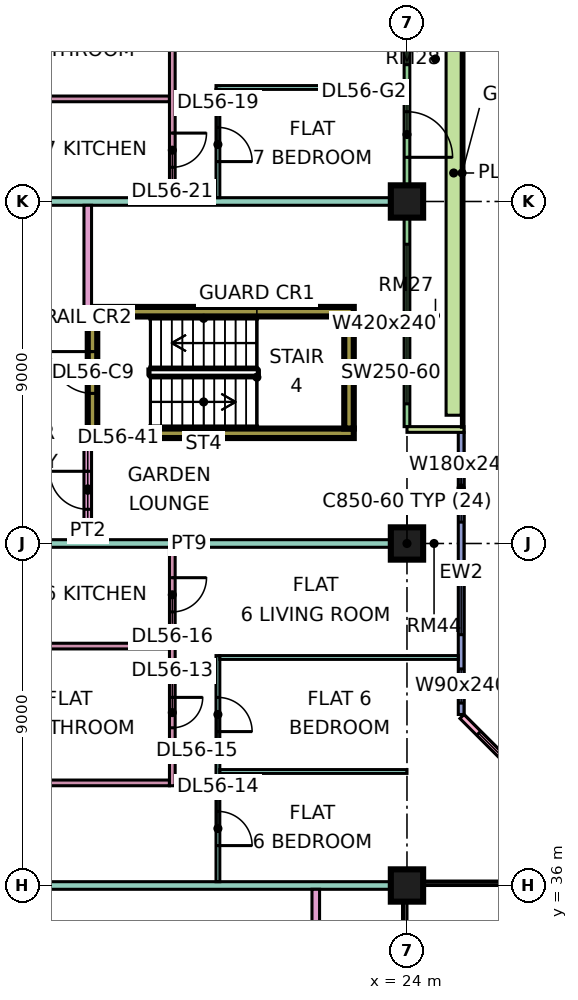
"""IFC4 building model, lengths in metres.
Left out: names, types, materials, properties, quantities, classifications, styles, units other than length and angle.
Written with IfcOpenShell. Run it as: python <this file> out.ifc"""

import sys

from ifc_helpers import new_model, si_unit, direction, frame, frame_2d, origin, origin_2d, place, context, subcontext, project, spatial, rectangle, extrude, element, fill, save


model = new_model("IFC4")
c1 = context("Model", 3, precision=1e-05, world=origin(), true_north=direction((0.0, 1.0)))
c2 = subcontext(c1, "Body", "Model", "MODEL_VIEW")
j1 = project(units=[si_unit("LENGTHUNIT", "METRE"), si_unit("PLANEANGLEUNIT", "RADIAN")], contexts=[c1])
p1 = place(None, origin())
s1 = spatial("IfcSite", under=j1, at=p1, CompositionType="ELEMENT")
p2 = place(p1, origin())
s2 = spatial("IfcBuilding", under=s1, at=p2, CompositionType="ELEMENT")
p3 = place(p2, frame((0.0, 0.0, 237.9)))
s3 = spatial("IfcBuildingStorey", under=s2, at=p3, CompositionType="ELEMENT", Elevation=237.9)
for number, where, z_axis, x_axis in (
    (1, (24.0, 36.0, 0.0), (0.0, 0.0, 1.0), (1.0, 0.0, 0.0)),
    (2, (24.0, 45.0, 0.0), (0.0, 0.0, 1.0), (1.0, 0.0, 0.0)),
    (3, (24.0, 54.0, 0.0), (0.0, 0.0, 1.0), (1.0, 0.0, 0.0)),
):
    element("IfcColumn", number, at=place(p3, frame(where, z_axis=z_axis, x_axis=x_axis)), inside=s3, PredefinedType="COLUMN", context=c2, shape_type="SweptSolid", body=[
        extrude(rectangle(XDim=0.85, YDim=0.85, at=origin_2d()), origin(), (0.0, 0.0, 1.0), 3.75),
    ])
for number, where, z_axis, x_axis in (
    (4, (15.6, 47.9, 0.0), (0.0, 0.0, 1.0), (1.0, 0.0, 0.0)),
    (5, (15.6, 51.1, 0.0), (0.0, 0.0, 1.0), (1.0, 0.0, 0.0)),
):
    element("IfcWall", number, at=place(p3, frame(where, z_axis=z_axis, x_axis=x_axis)), inside=s3, PredefinedType="SHEAR", context=c2, shape_type="SweptSolid", body=[
        extrude(rectangle(XDim=7.0, YDim=0.25, at=frame_2d((3.5, 0.0))), origin(), (0.0, 0.0, 1.0), 3.75),
    ])
p4 = place(p3, frame((15.725, 48.025, 0.0), z_axis=(0.0, 0.0, 1.0), x_axis=(0.0, 1.0, 0.0)))
e6 = element("IfcWall", 6, at=p4, inside=s3, PredefinedType="SHEAR", context=c2, shape_type="SweptSolid", body=[
    extrude(rectangle(XDim=2.95, YDim=0.25, at=frame_2d((1.475, 0.0))), origin(), (0.0, 0.0, 1.0), 3.75),
])
p5 = place(p4, frame((0.925, 0.0, 0.0)))
e7 = element("IfcOpeningElement", 7, at=p5, cuts=e6, PredefinedType="OPENING", context=c2, shape_type="SweptSolid", body=[
    extrude(rectangle(XDim=1.1, YDim=2.2, at=frame_2d((0.55, 1.1))), frame((0.0, 0.135, 0.0), z_axis=(0.0, -1.0, 0.0), x_axis=(1.0, 0.0, 0.0)), (0.0, 0.0, 1.0), 0.27),
])
p6 = place(p3, frame((22.475, 48.025, 0.0), z_axis=(0.0, 0.0, 1.0), x_axis=(0.0, 1.0, 0.0)))
e8 = element("IfcWall", 8, at=p6, inside=s3, PredefinedType="SHEAR", context=c2, shape_type="SweptSolid", body=[
    extrude(rectangle(XDim=2.95, YDim=0.25, at=frame_2d((1.475, 0.0))), origin(), (0.0, 0.0, 1.0), 3.75),
])
p7 = place(p3, frame((28.447, 37.447, 0.0), z_axis=(0.0, 0.0, 1.0), x_axis=(-0.707106781187, 0.707106781187, 0.0)))
e9 = element("IfcWall", 9, at=p7, inside=s3, PredefinedType="SOLIDWALL", context=c2, shape_type="SweptSolid", body=[
    extrude(rectangle(XDim=4.243, YDim=0.15, at=frame_2d((2.121, 0.0))), origin(), (0.0, 0.0, 1.0), 3.35),
])
p8 = place(p7, frame((0.621, 0.0, 0.45)))
e10 = element("IfcOpeningElement", 10, at=p8, cuts=e9, PredefinedType="OPENING", context=c2, shape_type="SweptSolid", body=[
    extrude(rectangle(XDim=3.0, YDim=2.4, at=frame_2d((1.5, 1.2))), frame((0.0, 0.085, 0.0), z_axis=(0.0, -1.0, 0.0), x_axis=(1.0, 0.0, 0.0)), (0.0, 0.0, 1.0), 0.17),
])
p9 = place(p3, frame((25.425, 40.5, 0.0), z_axis=(0.0, 0.0, 1.0), x_axis=(0.0, 1.0, 0.0)))
e11 = element("IfcWall", 11, at=p9, inside=s3, PredefinedType="SOLIDWALL", context=c2, shape_type="SweptSolid", body=[
    extrude(rectangle(XDim=7.425, YDim=0.15, at=frame_2d((3.712, 0.0))), origin(), (0.0, 0.0, 1.0), 3.35),
])
p10 = place(p9, frame((0.3, 0.0, 0.45)))
e12 = element("IfcOpeningElement", 12, at=p10, cuts=e11, PredefinedType="OPENING", context=c2, shape_type="SweptSolid", body=[
    extrude(rectangle(XDim=0.9, YDim=2.4, at=frame_2d((0.45, 1.2))), frame((0.0, 0.085, 0.0), z_axis=(0.0, -1.0, 0.0), x_axis=(1.0, 0.0, 0.0)), (0.0, 0.0, 1.0), 0.17),
])
p11 = place(p9, frame((2.1, 0.0, 0.45)))
e13 = element("IfcOpeningElement", 13, at=p11, cuts=e11, PredefinedType="OPENING", context=c2, shape_type="SweptSolid", body=[
    extrude(rectangle(XDim=1.8, YDim=2.4, at=frame_2d((0.9, 1.2))), frame((0.0, 0.085, 0.0), z_axis=(0.0, -1.0, 0.0), x_axis=(1.0, 0.0, 0.0)), (0.0, 0.0, 1.0), 0.17),
])
p12 = place(p9, frame((5.062, 0.0, 0.45)))
e14 = element("IfcOpeningElement", 14, at=p12, cuts=e11, PredefinedType="OPENING", context=c2, shape_type="SweptSolid", body=[
    extrude(rectangle(XDim=1.8, YDim=2.4, at=frame_2d((0.9, 1.2))), frame((0.0, 0.085, 0.0), z_axis=(0.0, -1.0, 0.0), x_axis=(1.0, 0.0, 0.0)), (0.0, 0.0, 1.0), 0.17),
])
p13 = place(p3, frame((24.0, 48.075, 0.0), z_axis=(0.0, 0.0, 1.0), x_axis=(0.0, 1.0, 0.0)))
e15 = element("IfcWall", 15, at=p13, inside=s3, PredefinedType="SOLIDWALL", context=c2, shape_type="SweptSolid", body=[
    extrude(rectangle(XDim=13.35, YDim=0.15, at=frame_2d((6.675, 0.0))), origin(), (0.0, 0.0, 1.0), 3.35),
])
p14 = place(p13, frame((0.6, 0.0, 0.45)))
e16 = element("IfcOpeningElement", 16, at=p14, cuts=e15, PredefinedType="OPENING", context=c2, shape_type="SweptSolid", body=[
    extrude(rectangle(XDim=4.2, YDim=2.4, at=frame_2d((2.1, 1.2))), frame((0.0, 0.085, 0.0), z_axis=(0.0, -1.0, 0.0), x_axis=(1.0, 0.0, 0.0)), (0.0, 0.0, 1.0), 0.17),
])
p15 = place(p13, frame((7.087, 0.0, 0.0)))
e17 = element("IfcOpeningElement", 17, at=p15, cuts=e15, PredefinedType="OPENING", context=c2, shape_type="SweptSolid", body=[
    extrude(rectangle(XDim=1.2, YDim=2.4, at=frame_2d((0.6, 1.2))), frame((0.0, 0.085, 0.0), z_axis=(0.0, -1.0, 0.0), x_axis=(1.0, 0.0, 0.0)), (0.0, 0.0, 1.0), 0.17),
])
p16 = place(p13, frame((9.525, 0.0, 0.45)))
e18 = element("IfcOpeningElement", 18, at=p16, cuts=e15, PredefinedType="OPENING", context=c2, shape_type="SweptSolid", body=[
    extrude(rectangle(XDim=1.8, YDim=2.4, at=frame_2d((0.9, 1.2))), frame((0.0, 0.085, 0.0), z_axis=(0.0, -1.0, 0.0), x_axis=(1.0, 0.0, 0.0)), (0.0, 0.0, 1.0), 0.17),
])
p17 = place(p13, frame((12.188, 0.0, 0.45)))
e19 = element("IfcOpeningElement", 19, at=p17, cuts=e15, PredefinedType="OPENING", context=c2, shape_type="SweptSolid", body=[
    extrude(rectangle(XDim=0.9, YDim=2.4, at=frame_2d((0.45, 1.2))), frame((0.0, 0.085, 0.0), z_axis=(0.0, -1.0, 0.0), x_axis=(1.0, 0.0, 0.0)), (0.0, 0.0, 1.0), 0.17),
])
p18 = place(p3, frame((25.5, 48.0, 0.0), z_axis=(0.0, 0.0, 1.0), x_axis=(-1.0, 0.0, 0.0)))
e20 = element("IfcWall", 20, at=p18, inside=s3, PredefinedType="SOLIDWALL", context=c2, shape_type="SweptSolid", body=[
    extrude(rectangle(XDim=1.5, YDim=0.15, at=frame_2d((0.75, 0.0))), origin(), (0.0, 0.0, 1.0), 3.35),
])
p19 = place(p3, frame((25.229, 48.375, 0.0), z_axis=(0.0, 0.0, 1.0), x_axis=(0.0, 1.0, 0.0)))
e21 = element("IfcWall", 21, at=p19, inside=s3, PredefinedType="SOLIDWALL", context=c2, shape_type="SweptSolid", body=[
    extrude(rectangle(XDim=12.75, YDim=0.4, at=frame_2d((6.375, 0.0))), origin(), (0.0, 0.0, 1.0), 0.7),
])
p20 = place(p3, frame((12.525, 36.0, 0.0), z_axis=(0.0, 0.0, 1.0), x_axis=(1.0, 0.0, 0.0)))
e22 = element("IfcWall", 22, at=p20, inside=s3, PredefinedType="PARTITIONING", context=c2, shape_type="SweptSolid", body=[
    extrude(rectangle(XDim=11.475, YDim=0.2, at=frame_2d((5.738, 0.0))), origin(), (0.0, 0.0, 1.0), 3.35),
])
for number, where, z_axis, x_axis in (
    (23, (12.525, 38.7, 0.0), (0.0, 0.0, 1.0), (1.0, 0.0, 0.0)),
    (24, (12.525, 42.3, 0.0), (0.0, 0.0, 1.0), (1.0, 0.0, 0.0)),
):
    element("IfcWall", number, at=place(p3, frame(where, z_axis=z_axis, x_axis=x_axis)), inside=s3, PredefinedType="PARTITIONING", context=c2, shape_type="SweptSolid", body=[
        extrude(rectangle(XDim=5.225, YDim=0.15, at=frame_2d((2.613, 0.0))), origin(), (0.0, 0.0, 1.0), 3.35),
    ])
p21 = place(p3, frame((12.525, 45.0, 0.0), z_axis=(0.0, 0.0, 1.0), x_axis=(1.0, 0.0, 0.0)))
e25 = element("IfcWall", 25, at=p21, inside=s3, PredefinedType="PARTITIONING", context=c2, shape_type="SweptSolid", body=[
    extrude(rectangle(XDim=11.475, YDim=0.2, at=frame_2d((5.738, 0.0))), origin(), (0.0, 0.0, 1.0), 3.35),
])
p22 = place(p3, frame((12.525, 54.0, 0.0), z_axis=(0.0, 0.0, 1.0), x_axis=(1.0, 0.0, 0.0)))
e26 = element("IfcWall", 26, at=p22, inside=s3, PredefinedType="PARTITIONING", context=c2, shape_type="SweptSolid", body=[
    extrude(rectangle(XDim=11.401, YDim=0.2, at=frame_2d((5.701, 0.0))), origin(), (0.0, 0.0, 1.0), 3.35),
])
p23 = place(p3, frame((12.525, 56.7, 0.0), z_axis=(0.0, 0.0, 1.0), x_axis=(1.0, 0.0, 0.0)))
e27 = element("IfcWall", 27, at=p23, inside=s3, PredefinedType="PARTITIONING", context=c2, shape_type="SweptSolid", body=[
    extrude(rectangle(XDim=5.225, YDim=0.15, at=frame_2d((2.613, 0.0))), origin(), (0.0, 0.0, 1.0), 3.35),
])
p24 = place(p3, frame((15.6, 45.1, 0.0), z_axis=(0.0, 0.0, 1.0), x_axis=(0.0, 1.0, 0.0)))
e28 = element("IfcWall", 28, at=p24, inside=s3, PredefinedType="PARTITIONING", context=c2, shape_type="SweptSolid", body=[
    extrude(rectangle(XDim=2.675, YDim=0.2, at=frame_2d((1.337, 0.0))), origin(), (0.0, 0.0, 1.0), 3.35),
])
p25 = place(p24, frame((0.8, 0.0, 0.0)))
e29 = element("IfcOpeningElement", 29, at=p25, cuts=e28, PredefinedType="OPENING", context=c2, shape_type="SweptSolid", body=[
    extrude(rectangle(XDim=1.0, YDim=2.1, at=frame_2d((0.5, 1.05))), frame((0.0, 0.11, 0.0), z_axis=(0.0, -1.0, 0.0), x_axis=(1.0, 0.0, 0.0)), (0.0, 0.0, 1.0), 0.22),
])
p26 = place(p3, frame((15.6, 51.225, 0.0), z_axis=(0.0, 0.0, 1.0), x_axis=(0.0, 1.0, 0.0)))
e30 = element("IfcWall", 30, at=p26, inside=s3, PredefinedType="PARTITIONING", context=c2, shape_type="SweptSolid", body=[
    extrude(rectangle(XDim=2.675, YDim=0.2, at=frame_2d((1.337, 0.0))), origin(), (0.0, 0.0, 1.0), 3.35),
])
p27 = place(p3, frame((17.825, 38.625, 0.0), z_axis=(0.0, 0.0, 1.0), x_axis=(0.0, 1.0, 0.0)))
e31 = element("IfcWall", 31, at=p27, inside=s3, PredefinedType="PARTITIONING", context=c2, shape_type="SweptSolid", body=[
    extrude(rectangle(XDim=6.275, YDim=0.15, at=frame_2d((3.137, 0.0))), origin(), (0.0, 0.0, 1.0), 3.35),
])
p28 = place(p27, frame((1.525, 0.0, 0.0)))
e32 = element("IfcOpeningElement", 32, at=p28, cuts=e31, PredefinedType="OPENING", context=c2, shape_type="SweptSolid", body=[
    extrude(rectangle(XDim=0.8, YDim=2.1, at=frame_2d((0.4, 1.05))), frame((0.0, 0.085, 0.0), z_axis=(0.0, -1.0, 0.0), x_axis=(1.0, 0.0, 0.0)), (0.0, 0.0, 1.0), 0.17),
])
p29 = place(p27, frame((4.575, 0.0, 0.0)))
e33 = element("IfcOpeningElement", 33, at=p29, cuts=e31, PredefinedType="OPENING", context=c2, shape_type="SweptSolid", body=[
    extrude(rectangle(XDim=0.9, YDim=2.1, at=frame_2d((0.45, 1.05))), frame((0.0, 0.085, 0.0), z_axis=(0.0, -1.0, 0.0), x_axis=(1.0, 0.0, 0.0)), (0.0, 0.0, 1.0), 0.17),
])
p30 = place(p3, frame((17.825, 54.1, 0.0), z_axis=(0.0, 0.0, 1.0), x_axis=(0.0, 1.0, 0.0)))
e34 = element("IfcWall", 34, at=p30, inside=s3, PredefinedType="PARTITIONING", context=c2, shape_type="SweptSolid", body=[
    extrude(rectangle(XDim=5.975, YDim=0.15, at=frame_2d((2.987, 0.0))), origin(), (0.0, 0.0, 1.0), 3.35),
])
p31 = place(p30, frame((3.9, 0.0, 0.0)))
e35 = element("IfcOpeningElement", 35, at=p31, cuts=e34, PredefinedType="OPENING", context=c2, shape_type="SweptSolid", body=[
    extrude(rectangle(XDim=0.8, YDim=2.1, at=frame_2d((0.4, 1.05))), frame((0.0, 0.085, 0.0), z_axis=(0.0, -1.0, 0.0), x_axis=(1.0, 0.0, 0.0)), (0.0, 0.0, 1.0), 0.17),
])
p32 = place(p30, frame((0.8, 0.0, 0.0)))
e36 = element("IfcOpeningElement", 36, at=p32, cuts=e34, PredefinedType="OPENING", context=c2, shape_type="SweptSolid", body=[
    extrude(rectangle(XDim=0.9, YDim=2.1, at=frame_2d((0.45, 1.05))), frame((0.0, 0.085, 0.0), z_axis=(0.0, -1.0, 0.0), x_axis=(1.0, 0.0, 0.0)), (0.0, 0.0, 1.0), 0.17),
])
p33 = place(p3, frame((18.975, 57.0, 0.0), z_axis=(0.0, 0.0, 1.0), x_axis=(1.0, 0.0, 0.0)))
e37 = element("IfcWall", 37, at=p33, inside=s3, PredefinedType="PARTITIONING", context=c2, shape_type="SweptSolid", body=[
    extrude(rectangle(XDim=4.951, YDim=0.1, at=frame_2d((2.476, 0.0))), origin(), (0.0, 0.0, 1.0), 3.35),
])
p34 = place(p3, frame((19.025, 36.1, 0.0), z_axis=(0.0, 0.0, 1.0), x_axis=(0.0, 1.0, 0.0)))
e38 = element("IfcWall", 38, at=p34, inside=s3, PredefinedType="PARTITIONING", context=c2, shape_type="SweptSolid", body=[
    extrude(rectangle(XDim=5.95, YDim=0.1, at=frame_2d((2.975, 0.0))), origin(), (0.0, 0.0, 1.0), 3.35),
])
p35 = place(p34, frame((0.95, 0.0, 0.0)))
e39 = element("IfcOpeningElement", 39, at=p35, cuts=e38, PredefinedType="OPENING", context=c2, shape_type="SweptSolid", body=[
    extrude(rectangle(XDim=0.9, YDim=2.1, at=frame_2d((0.45, 1.05))), frame((0.0, 0.06, 0.0), z_axis=(0.0, -1.0, 0.0), x_axis=(1.0, 0.0, 0.0)), (0.0, 0.0, 1.0), 0.12),
])
p36 = place(p34, frame((3.95, 0.0, 0.0)))
e40 = element("IfcOpeningElement", 40, at=p36, cuts=e38, PredefinedType="OPENING", context=c2, shape_type="SweptSolid", body=[
    extrude(rectangle(XDim=0.9, YDim=2.1, at=frame_2d((0.45, 1.05))), frame((0.0, 0.06, 0.0), z_axis=(0.0, -1.0, 0.0), x_axis=(1.0, 0.0, 0.0)), (0.0, 0.0, 1.0), 0.12),
])
p37 = place(p3, frame((19.025, 54.1, 0.0), z_axis=(0.0, 0.0, 1.0), x_axis=(0.0, 1.0, 0.0)))
e41 = element("IfcWall", 41, at=p37, inside=s3, PredefinedType="PARTITIONING", context=c2, shape_type="SweptSolid", body=[
    extrude(rectangle(XDim=2.85, YDim=0.1, at=frame_2d((1.425, 0.0))), origin(), (0.0, 0.0, 1.0), 3.35),
])
p38 = place(p37, frame((0.95, 0.0, 0.0)))
e42 = element("IfcOpeningElement", 42, at=p38, cuts=e41, PredefinedType="OPENING", context=c2, shape_type="SweptSolid", body=[
    extrude(rectangle(XDim=0.9, YDim=2.1, at=frame_2d((0.45, 1.05))), frame((0.0, 0.06, 0.0), z_axis=(0.0, -1.0, 0.0), x_axis=(1.0, 0.0, 0.0)), (0.0, 0.0, 1.0), 0.12),
])
p39 = place(p3, frame((19.075, 39.0, 0.0), z_axis=(0.0, 0.0, 1.0), x_axis=(1.0, 0.0, 0.0)))
e43 = element("IfcWall", 43, at=p39, inside=s3, PredefinedType="PARTITIONING", context=c2, shape_type="SweptSolid", body=[
    extrude(rectangle(XDim=4.925, YDim=0.1, at=frame_2d((2.462, 0.0))), origin(), (0.0, 0.0, 1.0), 3.35),
])
p40 = place(p3, frame((19.075, 42.0, 0.0), z_axis=(0.0, 0.0, 1.0), x_axis=(1.0, 0.0, 0.0)))
e44 = element("IfcWall", 44, at=p40, inside=s3, PredefinedType="PARTITIONING", context=c2, shape_type="SweptSolid", body=[
    extrude(rectangle(XDim=6.275, YDim=0.1, at=frame_2d((3.138, 0.0))), origin(), (0.0, 0.0, 1.0), 3.35),
])
p41 = place(p3, frame((21.6, 23.9, 0.0), z_axis=(0.0, 0.0, 1.0), x_axis=(0.0, 1.0, 0.0)))
e45 = element("IfcWall", 45, at=p41, inside=s3, PredefinedType="PARTITIONING", context=c2, shape_type="SweptSolid", body=[
    extrude(rectangle(XDim=12.0, YDim=0.2, at=frame_2d((6.0, 0.0))), origin(), (0.0, 0.0, 1.0), 3.35),
])
p42 = place(p8, origin())
e46 = element("IfcWindow", 46, at=p42, inside=s3, PartitioningType="SINGLE_PANEL", PredefinedType="WINDOW", context=c2, shape_type="SweptSolid", body=[
    extrude(rectangle(XDim=3.0, YDim=2.4, at=frame_2d((1.5, 1.2))), frame((0.0, 0.03, 0.0), z_axis=(0.0, -1.0, 0.0), x_axis=(1.0, 0.0, 0.0)), (0.0, 0.0, 1.0), 0.06),
])
fill(e10, e46)
p43 = place(p10, origin())
e47 = element("IfcWindow", 47, at=p43, inside=s3, PartitioningType="SINGLE_PANEL", PredefinedType="WINDOW", context=c2, shape_type="SweptSolid", body=[
    extrude(rectangle(XDim=0.9, YDim=2.4, at=frame_2d((0.45, 1.2))), frame((0.0, 0.03, 0.0), z_axis=(0.0, -1.0, 0.0), x_axis=(1.0, 0.0, 0.0)), (0.0, 0.0, 1.0), 0.06),
])
fill(e12, e47)
p44 = place(p11, origin())
e48 = element("IfcWindow", 48, at=p44, inside=s3, PartitioningType="SINGLE_PANEL", PredefinedType="WINDOW", context=c2, shape_type="SweptSolid", body=[
    extrude(rectangle(XDim=1.8, YDim=2.4, at=frame_2d((0.9, 1.2))), frame((0.0, 0.03, 0.0), z_axis=(0.0, -1.0, 0.0), x_axis=(1.0, 0.0, 0.0)), (0.0, 0.0, 1.0), 0.06),
])
fill(e13, e48)
p45 = place(p12, origin())
e49 = element("IfcWindow", 49, at=p45, inside=s3, PartitioningType="SINGLE_PANEL", PredefinedType="WINDOW", context=c2, shape_type="SweptSolid", body=[
    extrude(rectangle(XDim=1.8, YDim=2.4, at=frame_2d((0.9, 1.2))), frame((0.0, 0.03, 0.0), z_axis=(0.0, -1.0, 0.0), x_axis=(1.0, 0.0, 0.0)), (0.0, 0.0, 1.0), 0.06),
])
fill(e14, e49)
p46 = place(p14, origin())
e50 = element("IfcWindow", 50, at=p46, inside=s3, PartitioningType="SINGLE_PANEL", PredefinedType="WINDOW", context=c2, shape_type="SweptSolid", body=[
    extrude(rectangle(XDim=4.2, YDim=2.4, at=frame_2d((2.1, 1.2))), frame((0.0, 0.03, 0.0), z_axis=(0.0, -1.0, 0.0), x_axis=(1.0, 0.0, 0.0)), (0.0, 0.0, 1.0), 0.06),
])
fill(e16, e50)
p47 = place(p15, frame((1.2, 0.0, 0.0), z_axis=(0.0, 0.0, 1.0), x_axis=(-1.0, 0.0, 0.0)))
e51 = element("IfcDoor", 51, at=p47, inside=s3, OperationType="DOUBLE_DOOR_SINGLE_SWING", PredefinedType="DOOR", context=c2, shape_type="SweptSolid", body=[
    extrude(rectangle(XDim=1.2, YDim=2.4, at=frame_2d((0.6, 1.2))), frame((0.0, 0.025, 0.0), z_axis=(0.0, -1.0, 0.0), x_axis=(1.0, 0.0, 0.0)), (0.0, 0.0, 1.0), 0.05),
])
fill(e17, e51)
p48 = place(p16, origin())
e52 = element("IfcWindow", 52, at=p48, inside=s3, PartitioningType="SINGLE_PANEL", PredefinedType="WINDOW", context=c2, shape_type="SweptSolid", body=[
    extrude(rectangle(XDim=1.8, YDim=2.4, at=frame_2d((0.9, 1.2))), frame((0.0, 0.03, 0.0), z_axis=(0.0, -1.0, 0.0), x_axis=(1.0, 0.0, 0.0)), (0.0, 0.0, 1.0), 0.06),
])
fill(e18, e52)
p49 = place(p5, frame((1.1, 0.0, 0.0), z_axis=(0.0, 0.0, 1.0), x_axis=(-1.0, 0.0, 0.0)))
e53 = element("IfcDoor", 53, at=p49, inside=s3, OperationType="SINGLE_SWING_RIGHT", PredefinedType="DOOR", context=c2, shape_type="SweptSolid", body=[
    extrude(rectangle(XDim=1.1, YDim=2.2, at=frame_2d((0.55, 1.1))), frame((0.0, 0.025, 0.0), z_axis=(0.0, -1.0, 0.0), x_axis=(1.0, 0.0, 0.0)), (0.0, 0.0, 1.0), 0.05),
])
fill(e7, e53)
p50 = place(p28, origin())
e54 = element("IfcDoor", 54, at=p50, inside=s3, OperationType="SINGLE_SWING_RIGHT", PredefinedType="DOOR", context=c2, shape_type="SweptSolid", body=[
    extrude(rectangle(XDim=0.8, YDim=2.1, at=frame_2d((0.4, 1.05))), frame((0.0, 0.025, 0.0), z_axis=(0.0, -1.0, 0.0), x_axis=(1.0, 0.0, 0.0)), (0.0, 0.0, 1.0), 0.05),
])
fill(e32, e54)
p51 = place(p35, frame((0.9, 0.0, 0.0), z_axis=(0.0, 0.0, 1.0), x_axis=(-1.0, 0.0, 0.0)))
e55 = element("IfcDoor", 55, at=p51, inside=s3, OperationType="SINGLE_SWING_LEFT", PredefinedType="DOOR", context=c2, shape_type="SweptSolid", body=[
    extrude(rectangle(XDim=0.9, YDim=2.1, at=frame_2d((0.45, 1.05))), frame((0.0, 0.025, 0.0), z_axis=(0.0, -1.0, 0.0), x_axis=(1.0, 0.0, 0.0)), (0.0, 0.0, 1.0), 0.05),
])
fill(e39, e55)
p52 = place(p36, frame((0.9, 0.0, 0.0), z_axis=(0.0, 0.0, 1.0), x_axis=(-1.0, 0.0, 0.0)))
e56 = element("IfcDoor", 56, at=p52, inside=s3, OperationType="SINGLE_SWING_LEFT", PredefinedType="DOOR", context=c2, shape_type="SweptSolid", body=[
    extrude(rectangle(XDim=0.9, YDim=2.1, at=frame_2d((0.45, 1.05))), frame((0.0, 0.025, 0.0), z_axis=(0.0, -1.0, 0.0), x_axis=(1.0, 0.0, 0.0)), (0.0, 0.0, 1.0), 0.05),
])
fill(e40, e56)
p53 = place(p29, origin())
e57 = element("IfcDoor", 57, at=p53, inside=s3, OperationType="SINGLE_SWING_RIGHT", PredefinedType="DOOR", context=c2, shape_type="SweptSolid", body=[
    extrude(rectangle(XDim=0.9, YDim=2.1, at=frame_2d((0.45, 1.05))), frame((0.0, 0.025, 0.0), z_axis=(0.0, -1.0, 0.0), x_axis=(1.0, 0.0, 0.0)), (0.0, 0.0, 1.0), 0.05),
])
fill(e33, e57)
p54 = place(p38, frame((0.9, 0.0, 0.0), z_axis=(0.0, 0.0, 1.0), x_axis=(-1.0, 0.0, 0.0)))
e58 = element("IfcDoor", 58, at=p54, inside=s3, OperationType="SINGLE_SWING_LEFT", PredefinedType="DOOR", context=c2, shape_type="SweptSolid", body=[
    extrude(rectangle(XDim=0.9, YDim=2.1, at=frame_2d((0.45, 1.05))), frame((0.0, 0.025, 0.0), z_axis=(0.0, -1.0, 0.0), x_axis=(1.0, 0.0, 0.0)), (0.0, 0.0, 1.0), 0.05),
])
fill(e42, e58)
p55 = place(p32, origin())
e59 = element("IfcDoor", 59, at=p55, inside=s3, OperationType="SINGLE_SWING_RIGHT", PredefinedType="DOOR", context=c2, shape_type="SweptSolid", body=[
    extrude(rectangle(XDim=0.9, YDim=2.1, at=frame_2d((0.45, 1.05))), frame((0.0, 0.025, 0.0), z_axis=(0.0, -1.0, 0.0), x_axis=(1.0, 0.0, 0.0)), (0.0, 0.0, 1.0), 0.05),
])
fill(e36, e59)
p56 = place(p25, frame((1.0, 0.0, 0.0), z_axis=(0.0, 0.0, 1.0), x_axis=(-1.0, 0.0, 0.0)))
e60 = element("IfcDoor", 60, at=p56, inside=s3, OperationType="SINGLE_SWING_RIGHT", PredefinedType="DOOR", context=c2, shape_type="SweptSolid", body=[
    extrude(rectangle(XDim=1.0, YDim=2.1, at=frame_2d((0.5, 1.05))), frame((0.0, 0.025, 0.0), z_axis=(0.0, -1.0, 0.0), x_axis=(1.0, 0.0, 0.0)), (0.0, 0.0, 1.0), 0.05),
])
fill(e29, e60)
save(model, sys.argv[1])
